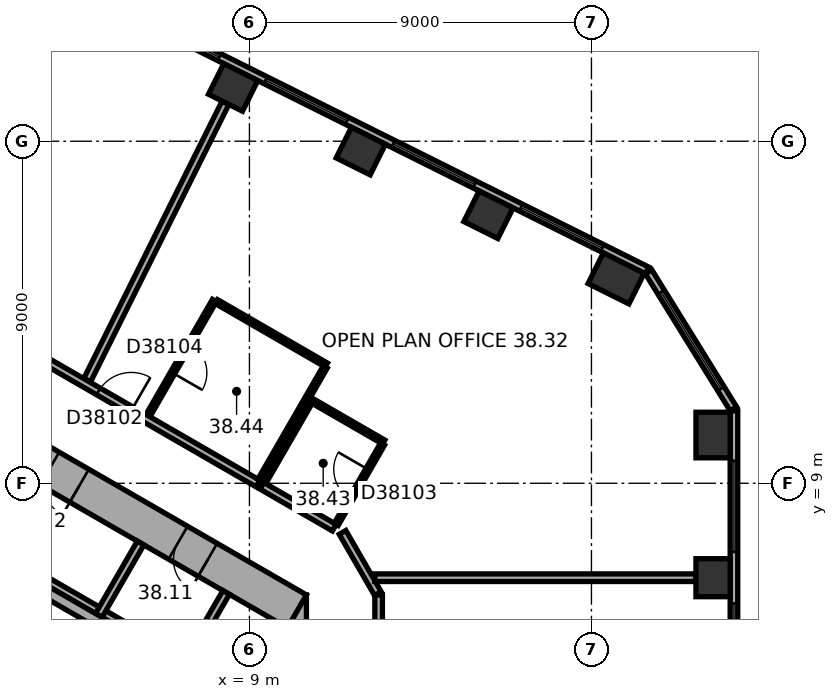
"""IFC4 building model, lengths in metres.
Left out: names, types, materials, properties, quantities, classifications, styles, units other than length and angle.
Written with IfcOpenShell. Run it as: python <this file> out.ifc"""

import sys

from ifc_helpers import new_model, si_unit, direction, frame, frame_2d, origin, origin_2d, place, context, subcontext, project, spatial, rectangle, extrude, element, fill, save


model = new_model("IFC4")
c1 = context("Model", 3, precision=1e-05, world=origin(), true_north=direction((0.0, 1.0)))
c2 = subcontext(c1, "Body", "Model", "MODEL_VIEW")
j1 = project(units=[si_unit("LENGTHUNIT", "METRE"), si_unit("PLANEANGLEUNIT", "RADIAN")], contexts=[c1])
p1 = place(None, origin())
s1 = spatial("IfcSite", under=j1, at=p1, CompositionType="ELEMENT")
p2 = place(p1, origin())
s2 = spatial("IfcBuilding", under=s1, at=p2, CompositionType="ELEMENT")
p3 = place(p2, frame((0.0, 0.0, 157.7)))
s3 = spatial("IfcBuildingStorey", under=s2, at=p3, CompositionType="ELEMENT", Elevation=157.7)
p4 = place(p3, frame((21.2, 6.515, 0.0), z_axis=(0.0, 0.0, 1.0), x_axis=(0.0, 1.0, 0.0)))
e1 = element("IfcColumn", 1, at=p4, inside=s3, PredefinedType="COLUMN", context=c2, shape_type="SweptSolid", body=[
    extrude(rectangle(XDim=1.0, YDim=0.9, at=origin_2d()), origin(), (0.0, 0.0, 1.0), 3.7),
])
for number, where, z_axis, x_axis in (
    (2, (21.2, 10.27, 0.0), (0.0, 0.0, 1.0), (0.0, 1.0, 0.0)),
    (3, (18.65, 14.39, 0.0), (0.0, 0.0, 1.0), (-0.895, 0.446, 0.0)),
):
    element("IfcColumn", number, at=place(p3, frame(where, z_axis=z_axis, x_axis=x_axis)), inside=s3, PredefinedType="COLUMN", context=c2, shape_type="SweptSolid", body=[
        extrude(rectangle(XDim=1.2, YDim=0.9, at=origin_2d()), origin(), (0.0, 0.0, 1.0), 3.7),
    ])
for number, where, z_axis, x_axis in (
    (4, (15.29, 16.065, 0.0), (0.0, 0.0, 1.0), (-0.895, 0.446, 0.0)),
    (5, (11.931, 17.74, 0.0), (0.0, 0.0, 1.0), (-0.895, 0.446, 0.0)),
    (6, (8.571, 19.416, 0.0), (0.0, 0.0, 1.0), (-0.895, 0.446, 0.0)),
):
    element("IfcColumn", number, at=place(p3, frame(where, z_axis=z_axis, x_axis=x_axis)), inside=s3, PredefinedType="COLUMN", context=c2, shape_type="SweptSolid", body=[
        extrude(rectangle(XDim=1.0, YDim=0.9, at=origin_2d()), origin(), (0.0, 0.0, 1.0), 3.7),
    ])
p5 = place(p3, frame((10.0, -6.062, 0.0), z_axis=(0.0, 0.0, 1.0), x_axis=(0.0, 1.0, 0.0)))
e7 = element("IfcWall", 7, at=p5, inside=s3, PredefinedType="SHEAR", context=c2, shape_type="SweptSolid", body=[
    extrude(rectangle(XDim=12.125, YDim=1.0, at=frame_2d((6.062, 0.0))), origin(), (0.0, 0.0, 1.0), 3.7),
])
p6 = place(p5, frame((6.262, 0.0, 0.0)))
e8 = element("IfcOpeningElement", 8, at=p6, cuts=e7, PredefinedType="OPENING", context=c2, shape_type="SweptSolid", body=[
    extrude(rectangle(XDim=1.5, YDim=2.1, at=frame_2d((0.75, 1.05))), frame((0.0, 0.51, 0.0), z_axis=(0.0, -1.0, 0.0), x_axis=(1.0, 0.0, 0.0)), (0.0, 0.0, 1.0), 1.02),
])
p7 = place(p5, frame((1.812, 0.0, 0.0)))
e9 = element("IfcOpeningElement", 9, at=p7, cuts=e7, PredefinedType="OPENING", context=c2, shape_type="SweptSolid", body=[
    extrude(rectangle(XDim=0.9, YDim=2.1, at=frame_2d((0.45, 1.05))), frame((0.0, 0.51, 0.0), z_axis=(0.0, -1.0, 0.0), x_axis=(1.0, 0.0, 0.0)), (0.0, 0.0, 1.0), 1.02),
])
p8 = place(p5, frame((4.412, 0.0, 0.0)))
e10 = element("IfcOpeningElement", 10, at=p8, cuts=e7, PredefinedType="OPENING", context=c2, shape_type="SweptSolid", body=[
    extrude(rectangle(XDim=0.9, YDim=2.1, at=frame_2d((0.45, 1.05))), frame((0.0, 0.51, 0.0), z_axis=(0.0, -1.0, 0.0), x_axis=(1.0, 0.0, 0.0)), (0.0, 0.0, 1.0), 1.02),
])
p9 = place(p3, frame((10.25, 5.629, 0.0), z_axis=(0.0, 0.0, 1.0), x_axis=(-0.866022616891, 0.50000482701, 0.0)))
e11 = element("IfcWall", 11, at=p9, inside=s3, PredefinedType="SHEAR", context=c2, shape_type="SweptSolid", body=[
    extrude(rectangle(XDim=12.125, YDim=1.0, at=frame_2d((6.062, 0.0))), origin(), (0.0, 0.0, 1.0), 3.7),
])
p10 = place(p9, frame((2.712, 0.0, 0.0)))
e12 = element("IfcOpeningElement", 12, at=p10, cuts=e11, PredefinedType="OPENING", context=c2, shape_type="SweptSolid", body=[
    extrude(rectangle(XDim=0.9, YDim=2.1, at=frame_2d((0.45, 1.05))), frame((0.0, 0.51, 0.0), z_axis=(0.0, -1.0, 0.0), x_axis=(1.0, 0.0, 0.0)), (0.0, 0.0, 1.0), 1.02),
])
p11 = place(p9, frame((6.612, 0.0, 0.0)))
e13 = element("IfcOpeningElement", 13, at=p11, cuts=e11, PredefinedType="OPENING", context=c2, shape_type="SweptSolid", body=[
    extrude(rectangle(XDim=0.9, YDim=2.1, at=frame_2d((0.45, 1.05))), frame((0.0, 0.51, 0.0), z_axis=(0.0, -1.0, 0.0), x_axis=(1.0, 0.0, 0.0)), (0.0, 0.0, 1.0), 1.02),
])
p12 = place(p3, frame((21.75, -9.138, 0.0), z_axis=(0.0, 0.0, 1.0), x_axis=(0.0, 1.0, 0.0)))
e14 = element("IfcWall", 14, at=p12, inside=s3, PredefinedType="STANDARD", context=c2, shape_type="SweptSolid", body=[
    extrude(rectangle(XDim=20.044, YDim=0.2, at=frame_2d((10.022, 0.0))), origin(), (0.0, 0.0, 1.0), 3.7),
])
p13 = place(p12, frame((1.314, 0.0, 0.9)))
e15 = element("IfcOpeningElement", 15, at=p13, cuts=e14, PredefinedType="OPENING", context=c2, shape_type="SweptSolid", body=[
    extrude(rectangle(XDim=2.4, YDim=2.0, at=frame_2d((1.2, 1.0))), frame((0.0, 0.11, 0.0), z_axis=(0.0, -1.0, 0.0), x_axis=(1.0, 0.0, 0.0)), (0.0, 0.0, 1.0), 0.22),
])
p14 = place(p12, frame((5.069, 0.0, 0.9)))
e16 = element("IfcOpeningElement", 16, at=p14, cuts=e14, PredefinedType="OPENING", context=c2, shape_type="SweptSolid", body=[
    extrude(rectangle(XDim=2.4, YDim=2.0, at=frame_2d((1.2, 1.0))), frame((0.0, 0.11, 0.0), z_axis=(0.0, -1.0, 0.0), x_axis=(1.0, 0.0, 0.0)), (0.0, 0.0, 1.0), 0.22),
])
p15 = place(p12, frame((8.823, 0.0, 0.9)))
e17 = element("IfcOpeningElement", 17, at=p15, cuts=e14, PredefinedType="OPENING", context=c2, shape_type="SweptSolid", body=[
    extrude(rectangle(XDim=2.4, YDim=2.0, at=frame_2d((1.2, 1.0))), frame((0.0, 0.11, 0.0), z_axis=(0.0, -1.0, 0.0), x_axis=(1.0, 0.0, 0.0)), (0.0, 0.0, 1.0), 0.22),
])
p16 = place(p12, frame((12.577, 0.0, 0.9)))
e18 = element("IfcOpeningElement", 18, at=p16, cuts=e14, PredefinedType="OPENING", context=c2, shape_type="SweptSolid", body=[
    extrude(rectangle(XDim=2.4, YDim=2.0, at=frame_2d((1.2, 1.0))), frame((0.0, 0.11, 0.0), z_axis=(0.0, -1.0, 0.0), x_axis=(1.0, 0.0, 0.0)), (0.0, 0.0, 1.0), 0.22),
])
p17 = place(p12, frame((16.331, 0.0, 0.9)))
e19 = element("IfcOpeningElement", 19, at=p17, cuts=e14, PredefinedType="OPENING", context=c2, shape_type="SweptSolid", body=[
    extrude(rectangle(XDim=2.4, YDim=2.0, at=frame_2d((1.2, 1.0))), frame((0.0, 0.11, 0.0), z_axis=(0.0, -1.0, 0.0), x_axis=(1.0, 0.0, 0.0)), (0.0, 0.0, 1.0), 0.22),
])
p18 = place(p3, frame((21.735, 10.958, 0.0), z_axis=(0.0, 0.0, 1.0), x_axis=(-0.526213807775, 0.850352296702, 0.0)))
e20 = element("IfcWall", 20, at=p18, inside=s3, PredefinedType="STANDARD", context=c2, shape_type="SweptSolid", body=[
    extrude(rectangle(XDim=4.238, YDim=0.2, at=frame_2d((2.119, 0.0))), origin(), (0.0, 0.0, 1.0), 3.7),
])
p19 = place(p18, frame((0.619, 0.0, 0.9)))
e21 = element("IfcOpeningElement", 21, at=p19, cuts=e20, PredefinedType="OPENING", context=c2, shape_type="SweptSolid", body=[
    extrude(rectangle(XDim=3.0, YDim=2.0, at=frame_2d((1.5, 1.0))), frame((0.0, 0.11, 0.0), z_axis=(0.0, -1.0, 0.0), x_axis=(1.0, 0.0, 0.0)), (0.0, 0.0, 1.0), 0.22),
])
p20 = place(p3, frame((19.464, 14.599, 0.0), z_axis=(0.0, 0.0, 1.0), x_axis=(-0.894935755043, 0.446195018289, 0.0)))
e22 = element("IfcWall", 22, at=p20, inside=s3, PredefinedType="STANDARD", context=c2, shape_type="SweptSolid", body=[
    extrude(rectangle(XDim=20.044, YDim=0.2, at=frame_2d((10.022, 0.0))), origin(), (0.0, 0.0, 1.0), 3.7),
])
p21 = place(p20, frame((1.313, 0.0, 0.9)))
e23 = element("IfcOpeningElement", 23, at=p21, cuts=e22, PredefinedType="OPENING", context=c2, shape_type="SweptSolid", body=[
    extrude(rectangle(XDim=2.4, YDim=2.0, at=frame_2d((1.2, 1.0))), frame((0.0, 0.11, 0.0), z_axis=(0.0, -1.0, 0.0), x_axis=(1.0, 0.0, 0.0)), (0.0, 0.0, 1.0), 0.22),
])
p22 = place(p20, frame((5.067, 0.0, 0.9)))
e24 = element("IfcOpeningElement", 24, at=p22, cuts=e22, PredefinedType="OPENING", context=c2, shape_type="SweptSolid", body=[
    extrude(rectangle(XDim=2.4, YDim=2.0, at=frame_2d((1.2, 1.0))), frame((0.0, 0.11, 0.0), z_axis=(0.0, -1.0, 0.0), x_axis=(1.0, 0.0, 0.0)), (0.0, 0.0, 1.0), 0.22),
])
p23 = place(p20, frame((8.821, 0.0, 0.9)))
e25 = element("IfcOpeningElement", 25, at=p23, cuts=e22, PredefinedType="OPENING", context=c2, shape_type="SweptSolid", body=[
    extrude(rectangle(XDim=2.4, YDim=2.0, at=frame_2d((1.2, 1.0))), frame((0.0, 0.11, 0.0), z_axis=(0.0, -1.0, 0.0), x_axis=(1.0, 0.0, 0.0)), (0.0, 0.0, 1.0), 0.22),
])
p24 = place(p20, frame((12.575, 0.0, 0.9)))
e26 = element("IfcOpeningElement", 26, at=p24, cuts=e22, PredefinedType="OPENING", context=c2, shape_type="SweptSolid", body=[
    extrude(rectangle(XDim=2.4, YDim=2.0, at=frame_2d((1.2, 1.0))), frame((0.0, 0.11, 0.0), z_axis=(0.0, -1.0, 0.0), x_axis=(1.0, 0.0, 0.0)), (0.0, 0.0, 1.0), 0.22),
])
p25 = place(p20, frame((16.329, 0.0, 0.9)))
e27 = element("IfcOpeningElement", 27, at=p25, cuts=e22, PredefinedType="OPENING", context=c2, shape_type="SweptSolid", body=[
    extrude(rectangle(XDim=2.4, YDim=2.0, at=frame_2d((1.2, 1.0))), frame((0.0, 0.11, 0.0), z_axis=(0.0, -1.0, 0.0), x_axis=(1.0, 0.0, 0.0)), (0.0, 0.0, 1.0), 0.22),
])
p26 = place(p3, frame((7.424, 4.259, 0.0), z_axis=(0.0, 0.0, 1.0), x_axis=(-0.866026010844, 0.49999894854, 0.0)))
e28 = element("IfcWall", 28, at=p26, inside=s3, PredefinedType="PARTITIONING", context=c2, shape_type="SweptSolid", body=[
    extrude(rectangle(XDim=8.0, YDim=0.2, at=frame_2d((4.0, 0.0))), origin(), (0.0, 0.0, 1.0), 3.42),
])
for number, where, z_axis, x_axis in (
    (29, (7.287, 4.222, 0.0), (0.0, 0.0, 1.0), (0.5, 0.866, 0.0)),
    (30, (5.036, 5.522, 0.0), (0.0, 0.0, 1.0), (0.5, 0.866, 0.0)),
):
    element("IfcWall", number, at=place(p3, frame(where, z_axis=z_axis, x_axis=x_axis)), inside=s3, PredefinedType="PARTITIONING", context=c2, shape_type="SweptSolid", body=[
        extrude(rectangle(XDim=2.2, YDim=0.2, at=frame_2d((1.1, 0.0))), origin(), (0.0, 0.0, 1.0), 3.42),
    ])
p27 = place(p3, frame((6.303, 4.617, 0.0), z_axis=(0.0, 0.0, 1.0), x_axis=(-0.866027801685, 0.499995846692, 0.0)))
e31 = element("IfcWall", 31, at=p27, inside=s3, PredefinedType="SHEAR", context=c2, shape_type="SweptSolid", body=[
    extrude(rectangle(XDim=7.06, YDim=0.3, at=frame_2d((3.53, 0.0))), origin(), (0.0, 0.0, 1.0), 3.42),
])
p28 = place(p3, frame((6.33, 10.779, 0.0), z_axis=(0.0, 0.0, 1.0), x_axis=(0.500010275428, 0.866019471182, 0.0)))
e32 = element("IfcWall", 32, at=p28, inside=s3, PredefinedType="PARTITIONING", context=c2, shape_type="SweptSolid", body=[
    extrude(rectangle(XDim=3.5, YDim=0.12, at=frame_2d((1.75, 0.0))), origin(), (0.0, 0.0, 1.0), 3.42),
])
p29 = place(p28, frame((1.3, 0.0, 0.0)))
e33 = element("IfcOpeningElement", 33, at=p29, cuts=e32, PredefinedType="OPENING", context=c2, shape_type="SweptSolid", body=[
    extrude(rectangle(XDim=0.9, YDim=2.1, at=frame_2d((0.45, 1.05))), frame((0.0, 0.07, 0.0), z_axis=(0.0, -1.0, 0.0), x_axis=(1.0, 0.0, 0.0)), (0.0, 0.0, 1.0), 0.14),
])
p30 = place(p3, frame((8.132, 13.78, 0.0), z_axis=(0.0, 0.0, 1.0), x_axis=(0.866039519639, -0.499975549825, 0.0)))
e34 = element("IfcWall", 34, at=p30, inside=s3, PredefinedType="PARTITIONING", context=c2, shape_type="SweptSolid", body=[
    extrude(rectangle(XDim=3.34, YDim=0.12, at=frame_2d((1.67, 0.0))), origin(), (0.0, 0.0, 1.0), 3.42),
])
p31 = place(p3, frame((8.37, 19.013, 0.0), z_axis=(0.0, 0.0, 1.0), x_axis=(-0.446183598632, -0.894941448538, 0.0)))
e35 = element("IfcWall", 35, at=p31, inside=s3, PredefinedType="PARTITIONING", context=c2, shape_type="SweptSolid", body=[
    extrude(rectangle(XDim=8.156, YDim=0.2, at=frame_2d((4.078, 0.0))), origin(), (0.0, 0.0, 1.0), 3.42),
])
p32 = place(p3, frame((9.224, 8.993, 0.0), z_axis=(0.0, 0.0, 1.0), x_axis=(-0.866031754707, 0.499988999718, 0.0)))
e36 = element("IfcWall", 36, at=p32, inside=s3, PredefinedType="PARTITIONING", context=c2, shape_type="SweptSolid", body=[
    extrude(rectangle(XDim=9.514, YDim=0.2, at=frame_2d((4.757, 0.0))), origin(), (0.0, 0.0, 1.0), 3.42),
])
p33 = place(p32, frame((3.848, 0.0, 0.0)))
e37 = element("IfcOpeningElement", 37, at=p33, cuts=e36, PredefinedType="OPENING", context=c2, shape_type="SweptSolid", body=[
    extrude(rectangle(XDim=1.0, YDim=2.1, at=frame_2d((0.5, 1.05))), frame((0.0, 0.11, 0.0), z_axis=(0.0, -1.0, 0.0), x_axis=(1.0, 0.0, 0.0)), (0.0, 0.0, 1.0), 0.22),
])
p34 = place(p3, frame((9.378, 9.019, 0.0), z_axis=(0.0, 0.0, 1.0), x_axis=(0.500004234368, 0.866022959057, 0.0)))
e38 = element("IfcWall", 38, at=p34, inside=s3, PredefinedType="PARTITIONING", context=c2, shape_type="SweptSolid", body=[
    extrude(rectangle(XDim=2.5, YDim=0.12, at=frame_2d((1.25, 0.0))), origin(), (0.0, 0.0, 1.0), 3.42),
])
p35 = place(p3, frame((10.68, 11.154, 0.0), z_axis=(0.0, 0.0, 1.0), x_axis=(0.86600889856, -0.500028586798, 0.0)))
e39 = element("IfcWall", 39, at=p35, inside=s3, PredefinedType="PARTITIONING", context=c2, shape_type="SweptSolid", body=[
    extrude(rectangle(XDim=2.14, YDim=0.12, at=frame_2d((1.07, 0.0))), origin(), (0.0, 0.0, 1.0), 3.42),
])
p36 = place(p3, frame((10.994, 12.058, 0.0), z_axis=(0.0, 0.0, 1.0), x_axis=(-0.500009156386, -0.866020117278, 0.0)))
e40 = element("IfcWall", 40, at=p36, inside=s3, PredefinedType="PARTITIONING", context=c2, shape_type="SweptSolid", body=[
    extrude(rectangle(XDim=3.44, YDim=0.12, at=frame_2d((1.72, 0.0))), origin(), (0.0, 0.0, 1.0), 3.42),
])
p37 = place(p3, frame((11.233, 7.833, 0.0), z_axis=(0.0, 0.0, 1.0), x_axis=(-0.866008176907, 0.50002983664, 0.0)))
e41 = element("IfcWall", 41, at=p37, inside=s3, PredefinedType="PARTITIONING", context=c2, shape_type="SweptSolid", body=[
    extrude(rectangle(XDim=2.2, YDim=0.2, at=frame_2d((1.1, 0.0))), origin(), (0.0, 0.0, 1.0), 3.42),
])
p38 = place(p3, frame((12.38, 6.097, 0.0), z_axis=(0.0, 0.0, 1.0), x_axis=(-0.499964847546, 0.866045698112, 0.0)))
e42 = element("IfcWall", 42, at=p38, inside=s3, PredefinedType="PARTITIONING", context=c2, shape_type="SweptSolid", body=[
    extrude(rectangle(XDim=1.86, YDim=0.2, at=frame_2d((0.93, 0.0))), origin(), (0.0, 0.0, 1.0), 3.42),
])
p39 = place(p3, frame((12.4, 2.761, 0.0), z_axis=(0.0, 0.0, 1.0), x_axis=(0.0, 1.0, 0.0)))
e43 = element("IfcWall", 43, at=p39, inside=s3, PredefinedType="PARTITIONING", context=c2, shape_type="SweptSolid", body=[
    extrude(rectangle(XDim=3.301, YDim=0.2, at=frame_2d((1.65, 0.0))), origin(), (0.0, 0.0, 1.0), 3.42),
])
p40 = place(p3, frame((12.503, 10.032, 0.0), z_axis=(0.0, 0.0, 1.0), x_axis=(-0.500002508028, -0.866023955769, 0.0)))
e44 = element("IfcWall", 44, at=p40, inside=s3, PredefinedType="PARTITIONING", context=c2, shape_type="SweptSolid", body=[
    extrude(rectangle(XDim=2.44, YDim=0.12, at=frame_2d((1.22, 0.0))), origin(), (0.0, 0.0, 1.0), 3.42),
])
p41 = place(p40, frame((0.77, 0.0, 0.0)))
e45 = element("IfcOpeningElement", 45, at=p41, cuts=e44, PredefinedType="OPENING", context=c2, shape_type="SweptSolid", body=[
    extrude(rectangle(XDim=0.9, YDim=2.1, at=frame_2d((0.45, 1.05))), frame((0.0, 0.07, 0.0), z_axis=(0.0, -1.0, 0.0), x_axis=(1.0, 0.0, 0.0)), (0.0, 0.0, 1.0), 0.14),
])
p42 = place(p3, frame((20.75, 6.515, 0.0), z_axis=(0.0, 0.0, 1.0), x_axis=(-1.0, 0.0, 0.0)))
e46 = element("IfcWall", 46, at=p42, inside=s3, PredefinedType="PARTITIONING", context=c2, shape_type="SweptSolid", body=[
    extrude(rectangle(XDim=8.452, YDim=0.2, at=frame_2d((4.226, 0.0))), origin(), (0.0, 0.0, 1.0), 3.42),
])
p43 = place(p16, origin())
e47 = element("IfcWindow", 47, at=p43, inside=s3, PartitioningType="SINGLE_PANEL", PredefinedType="WINDOW", context=c2, shape_type="SweptSolid", body=[
    extrude(rectangle(XDim=2.4, YDim=2.0, at=frame_2d((1.2, 1.0))), frame((0.0, 0.03, 0.0), z_axis=(0.0, -1.0, 0.0), x_axis=(1.0, 0.0, 0.0)), (0.0, 0.0, 1.0), 0.06),
])
fill(e18, e47)
p44 = place(p17, origin())
e48 = element("IfcWindow", 48, at=p44, inside=s3, PartitioningType="SINGLE_PANEL", PredefinedType="WINDOW", context=c2, shape_type="SweptSolid", body=[
    extrude(rectangle(XDim=2.4, YDim=2.0, at=frame_2d((1.2, 1.0))), frame((0.0, 0.03, 0.0), z_axis=(0.0, -1.0, 0.0), x_axis=(1.0, 0.0, 0.0)), (0.0, 0.0, 1.0), 0.06),
])
fill(e19, e48)
p45 = place(p19, origin())
e49 = element("IfcWindow", 49, at=p45, inside=s3, PartitioningType="SINGLE_PANEL", PredefinedType="WINDOW", context=c2, shape_type="SweptSolid", body=[
    extrude(rectangle(XDim=3.0, YDim=2.0, at=frame_2d((1.5, 1.0))), frame((0.0, 0.03, 0.0), z_axis=(0.0, -1.0, 0.0), x_axis=(1.0, 0.0, 0.0)), (0.0, 0.0, 1.0), 0.06),
])
fill(e21, e49)
p46 = place(p21, origin())
e50 = element("IfcWindow", 50, at=p46, inside=s3, PartitioningType="SINGLE_PANEL", PredefinedType="WINDOW", context=c2, shape_type="SweptSolid", body=[
    extrude(rectangle(XDim=2.4, YDim=2.0, at=frame_2d((1.2, 1.0))), frame((0.0, 0.03, 0.0), z_axis=(0.0, -1.0, 0.0), x_axis=(1.0, 0.0, 0.0)), (0.0, 0.0, 1.0), 0.06),
])
fill(e23, e50)
p47 = place(p22, origin())
e51 = element("IfcWindow", 51, at=p47, inside=s3, PartitioningType="SINGLE_PANEL", PredefinedType="WINDOW", context=c2, shape_type="SweptSolid", body=[
    extrude(rectangle(XDim=2.4, YDim=2.0, at=frame_2d((1.2, 1.0))), frame((0.0, 0.03, 0.0), z_axis=(0.0, -1.0, 0.0), x_axis=(1.0, 0.0, 0.0)), (0.0, 0.0, 1.0), 0.06),
])
fill(e24, e51)
p48 = place(p23, origin())
e52 = element("IfcWindow", 52, at=p48, inside=s3, PartitioningType="SINGLE_PANEL", PredefinedType="WINDOW", context=c2, shape_type="SweptSolid", body=[
    extrude(rectangle(XDim=2.4, YDim=2.0, at=frame_2d((1.2, 1.0))), frame((0.0, 0.03, 0.0), z_axis=(0.0, -1.0, 0.0), x_axis=(1.0, 0.0, 0.0)), (0.0, 0.0, 1.0), 0.06),
])
fill(e25, e52)
p49 = place(p24, origin())
e53 = element("IfcWindow", 53, at=p49, inside=s3, PartitioningType="SINGLE_PANEL", PredefinedType="WINDOW", context=c2, shape_type="SweptSolid", body=[
    extrude(rectangle(XDim=2.4, YDim=2.0, at=frame_2d((1.2, 1.0))), frame((0.0, 0.03, 0.0), z_axis=(0.0, -1.0, 0.0), x_axis=(1.0, 0.0, 0.0)), (0.0, 0.0, 1.0), 0.06),
])
fill(e26, e53)
p50 = place(p10, origin())
e54 = element("IfcDoor", 54, at=p50, inside=s3, OperationType="SINGLE_SWING_LEFT", PredefinedType="DOOR", context=c2, shape_type="SweptSolid", body=[
    extrude(rectangle(XDim=0.9, YDim=2.1, at=frame_2d((0.45, 1.05))), frame((0.0, 0.025, 0.0), z_axis=(0.0, -1.0, 0.0), x_axis=(1.0, 0.0, 0.0)), (0.0, 0.0, 1.0), 0.05),
])
fill(e12, e54)
p51 = place(p11, origin())
e55 = element("IfcDoor", 55, at=p51, inside=s3, OperationType="SINGLE_SWING_LEFT", PredefinedType="DOOR", context=c2, shape_type="SweptSolid", body=[
    extrude(rectangle(XDim=0.9, YDim=2.1, at=frame_2d((0.45, 1.05))), frame((0.0, 0.025, 0.0), z_axis=(0.0, -1.0, 0.0), x_axis=(1.0, 0.0, 0.0)), (0.0, 0.0, 1.0), 0.05),
])
fill(e13, e55)
p52 = place(p33, origin())
e56 = element("IfcDoor", 56, at=p52, inside=s3, OperationType="SINGLE_SWING_LEFT", PredefinedType="DOOR", context=c2, shape_type="SweptSolid", body=[
    extrude(rectangle(XDim=1.0, YDim=2.1, at=frame_2d((0.5, 1.05))), frame((0.0, 0.025, 0.0), z_axis=(0.0, -1.0, 0.0), x_axis=(1.0, 0.0, 0.0)), (0.0, 0.0, 1.0), 0.05),
])
fill(e37, e56)
p53 = place(p41, origin())
e57 = element("IfcDoor", 57, at=p53, inside=s3, OperationType="SINGLE_SWING_LEFT", PredefinedType="DOOR", context=c2, shape_type="SweptSolid", body=[
    extrude(rectangle(XDim=0.9, YDim=2.1, at=frame_2d((0.45, 1.05))), frame((0.0, 0.025, 0.0), z_axis=(0.0, -1.0, 0.0), x_axis=(1.0, 0.0, 0.0)), (0.0, 0.0, 1.0), 0.05),
])
fill(e45, e57)
p54 = place(p29, origin())
e58 = element("IfcDoor", 58, at=p54, inside=s3, OperationType="SINGLE_SWING_LEFT", PredefinedType="DOOR", context=c2, shape_type="SweptSolid", body=[
    extrude(rectangle(XDim=0.9, YDim=2.1, at=frame_2d((0.45, 1.05))), frame((0.0, 0.025, 0.0), z_axis=(0.0, -1.0, 0.0), x_axis=(1.0, 0.0, 0.0)), (0.0, 0.0, 1.0), 0.05),
])
fill(e33, e58)
save(model, sys.argv[1])
